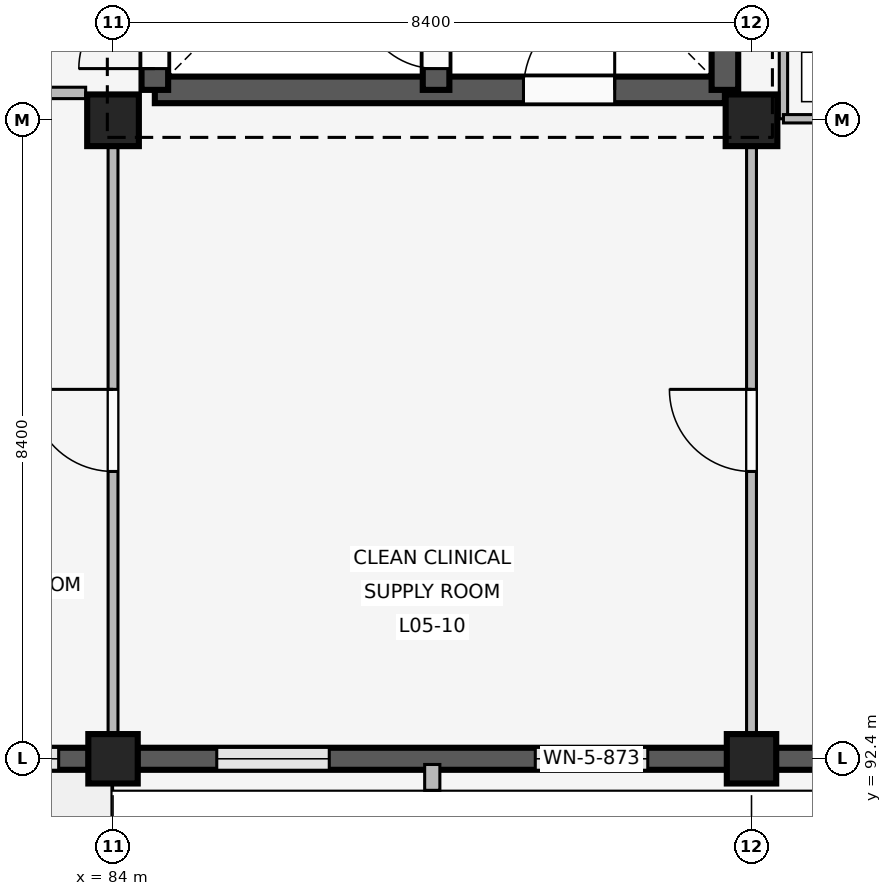
"""IFC4 building model, lengths in metres.
Left out: names, types, materials, properties, quantities, classifications, styles, units other than length and angle.
Written with IfcOpenShell. Run it as: python <this file> out.ifc"""

import sys

from ifc_helpers import new_model, si_unit, direction, frame, frame_2d, origin, origin_2d, place, context, subcontext, project, spatial, rectangle, extrude, element, fill, save


model = new_model("IFC4")
c1 = context("Model", 3, precision=1e-05, world=origin(), true_north=direction((0.0, 1.0)))
c2 = subcontext(c1, "Body", "Model", "MODEL_VIEW")
j1 = project(units=[si_unit("LENGTHUNIT", "METRE"), si_unit("PLANEANGLEUNIT", "RADIAN")], contexts=[c1])
p1 = place(None, origin())
s1 = spatial("IfcSite", under=j1, at=p1, CompositionType="ELEMENT")
p2 = place(p1, origin())
s2 = spatial("IfcBuilding", under=s1, at=p2, CompositionType="ELEMENT")
p3 = place(p2, frame((0.0, 0.0, 20.4)))
s3 = spatial("IfcBuildingStorey", under=s2, at=p3, CompositionType="ELEMENT", Elevation=20.4)
p4 = place(p3, frame((84.0, 92.4, 0.0), z_axis=(0.0, 0.0, 1.0), x_axis=(1.0, 0.0, 0.0)))
e1 = element("IfcColumn", 1, at=p4, inside=s3, PredefinedType="COLUMN", context=c2, shape_type="SweptSolid", body=[
    extrude(rectangle(XDim=0.65, YDim=0.65, at=origin_2d()), origin(), (0.0, 0.0, 1.0), 4.2),
])
p5 = place(p3, frame((84.0, 100.8, 0.0), z_axis=(0.0, 0.0, 1.0), x_axis=(1.0, 0.0, 0.0)))
e2 = element("IfcColumn", 2, at=p5, inside=s3, PredefinedType="COLUMN", context=c2, shape_type="SweptSolid", body=[
    extrude(rectangle(XDim=0.68, YDim=0.68, at=origin_2d()), origin(), (0.0, 0.0, 1.0), 4.2),
])
p6 = place(p3, frame((92.4, 92.4, 0.0), z_axis=(0.0, 0.0, 1.0), x_axis=(1.0, 0.0, 0.0)))
e3 = element("IfcColumn", 3, at=p6, inside=s3, PredefinedType="COLUMN", context=c2, shape_type="SweptSolid", body=[
    extrude(rectangle(XDim=0.65, YDim=0.65, at=origin_2d()), origin(), (0.0, 0.0, 1.0), 4.2),
])
p7 = place(p3, frame((92.4, 100.8, 0.0), z_axis=(0.0, 0.0, 1.0), x_axis=(1.0, 0.0, 0.0)))
e4 = element("IfcColumn", 4, at=p7, inside=s3, PredefinedType="COLUMN", context=c2, shape_type="SweptSolid", body=[
    extrude(rectangle(XDim=0.68, YDim=0.68, at=origin_2d()), origin(), (0.0, 0.0, 1.0), 4.2),
])
p8 = place(p3, frame((83.68, 92.4, 0.0), z_axis=(0.0, 0.0, 1.0), x_axis=(-1.0, 0.0, 0.0)))
e5 = element("IfcWall", 5, at=p8, inside=s3, PredefinedType="SOLIDWALL", context=c2, shape_type="SweptSolid", body=[
    extrude(rectangle(XDim=7.76, YDim=0.29, at=frame_2d((3.88, 0.0))), origin(), (0.0, 0.0, 1.0), 3.34),
])
p9 = place(p8, frame((0.395, 0.0, 0.85)))
e6 = element("IfcOpeningElement", 6, at=p9, cuts=e5, PredefinedType="OPENING", context=c2, shape_type="SweptSolid", body=[
    extrude(rectangle(XDim=1.58, YDim=1.7, at=frame_2d((0.79, 0.85))), frame((0.0, 0.155, 0.0), z_axis=(0.0, -1.0, 0.0), x_axis=(1.0, 0.0, 0.0)), (0.0, 0.0, 1.0), 0.31),
])
p10 = place(p8, frame((5.185, 0.0, 0.85)))
e7 = element("IfcOpeningElement", 7, at=p10, cuts=e5, PredefinedType="OPENING", context=c2, shape_type="SweptSolid", body=[
    extrude(rectangle(XDim=1.58, YDim=1.7, at=frame_2d((0.79, 0.85))), frame((0.0, 0.155, 0.0), z_axis=(0.0, -1.0, 0.0), x_axis=(1.0, 0.0, 0.0)), (0.0, 0.0, 1.0), 0.31),
])
p11 = place(p3, frame((92.08, 92.4, 0.0), z_axis=(0.0, 0.0, 1.0), x_axis=(-1.0, 0.0, 0.0)))
e8 = element("IfcWall", 8, at=p11, inside=s3, PredefinedType="SOLIDWALL", context=c2, shape_type="SweptSolid", body=[
    extrude(rectangle(XDim=7.76, YDim=0.29, at=frame_2d((3.88, 0.0))), origin(), (0.0, 0.0, 1.0), 3.34),
])
p12 = place(p11, frame((1.045, 0.0, 0.85)))
e9 = element("IfcOpeningElement", 9, at=p12, cuts=e8, PredefinedType="OPENING", context=c2, shape_type="SweptSolid", body=[
    extrude(rectangle(XDim=1.48, YDim=1.6, at=frame_2d((0.74, 0.8))), frame((0.0, 0.155, 0.0), z_axis=(0.0, -1.0, 0.0), x_axis=(1.0, 0.0, 0.0)), (0.0, 0.0, 1.0), 0.31),
])
p13 = place(p11, frame((5.235, 0.0, 0.85)))
e10 = element("IfcOpeningElement", 10, at=p13, cuts=e8, PredefinedType="OPENING", context=c2, shape_type="SweptSolid", body=[
    extrude(rectangle(XDim=1.48, YDim=1.6, at=frame_2d((0.74, 0.8))), frame((0.0, 0.155, 0.0), z_axis=(0.0, -1.0, 0.0), x_axis=(1.0, 0.0, 0.0)), (0.0, 0.0, 1.0), 0.31),
])
p14 = place(p3, frame((88.2, 92.325, 0.0), z_axis=(0.0, 0.0, 1.0), x_axis=(0.0, -1.0, 0.0)))
e11 = element("IfcWall", 11, at=p14, inside=s3, PredefinedType="ELEMENTEDWALL", context=c2, shape_type="SweptSolid", body=[
    extrude(rectangle(XDim=0.34, YDim=0.2, at=frame_2d((0.17, 0.0))), origin(), (0.0, 0.0, 1.0), 3.32),
])
p15 = place(p3, frame((100.48, 92.4, 0.0), z_axis=(0.0, 0.0, 1.0), x_axis=(-1.0, 0.0, 0.0)))
e12 = element("IfcWall", 12, at=p15, inside=s3, PredefinedType="SOLIDWALL", context=c2, shape_type="SweptSolid", body=[
    extrude(rectangle(XDim=7.76, YDim=0.29, at=frame_2d((3.88, 0.0))), origin(), (0.0, 0.0, 1.0), 3.34),
])
p16 = place(p15, frame((1.075, 0.0, 0.85)))
e13 = element("IfcOpeningElement", 13, at=p16, cuts=e12, PredefinedType="OPENING", context=c2, shape_type="SweptSolid", body=[
    extrude(rectangle(XDim=1.42, YDim=1.45, at=frame_2d((0.71, 0.725))), frame((0.0, 0.155, 0.0), z_axis=(0.0, -1.0, 0.0), x_axis=(1.0, 0.0, 0.0)), (0.0, 0.0, 1.0), 0.31),
])
p17 = place(p15, frame((5.265, 0.0, 0.85)))
e14 = element("IfcOpeningElement", 14, at=p17, cuts=e12, PredefinedType="OPENING", context=c2, shape_type="SweptSolid", body=[
    extrude(rectangle(XDim=1.42, YDim=1.45, at=frame_2d((0.71, 0.725))), frame((0.0, 0.155, 0.0), z_axis=(0.0, -1.0, 0.0), x_axis=(1.0, 0.0, 0.0)), (0.0, 0.0, 1.0), 0.31),
])
p18 = place(p3, frame((84.55, 101.2, 0.0), z_axis=(0.0, 0.0, 1.0), x_axis=(1.0, 0.0, 0.0)))
e15 = element("IfcWall", 15, at=p18, inside=s3, PredefinedType="SHEAR", context=c2, shape_type="SweptSolid", body=[
    extrude(rectangle(XDim=7.5, YDim=0.35, at=frame_2d((3.75, 0.0))), origin(), (0.0, 0.0, 1.0), 3.92),
])
p19 = place(p18, frame((4.85, 0.0, 0.0)))
e16 = element("IfcOpeningElement", 16, at=p19, cuts=e15, PredefinedType="OPENING", context=c2, shape_type="SweptSolid", body=[
    extrude(rectangle(XDim=1.2, YDim=2.2, at=frame_2d((0.6, 1.1))), frame((0.0, 0.185, 0.0), z_axis=(0.0, -1.0, 0.0), x_axis=(1.0, 0.0, 0.0)), (0.0, 0.0, 1.0), 0.37),
])
p20 = place(p3, frame((84.55, 101.2, 0.0), z_axis=(0.0, 0.0, 1.0), x_axis=(0.0, 1.0, 0.0)))
e17 = element("IfcWall", 17, at=p20, inside=s3, PredefinedType="SHEAR", context=c2, shape_type="SweptSolid", body=[
    extrude(rectangle(XDim=7.55, YDim=0.35, at=frame_2d((3.775, 0.0))), origin(), (0.0, 0.0, 1.0), 3.92),
])
p21 = place(p20, frame((0.28, 0.0, 0.0)))
e18 = element("IfcOpeningElement", 18, at=p21, cuts=e17, PredefinedType="OPENING", context=c2, shape_type="SweptSolid", body=[
    extrude(rectangle(XDim=1.0, YDim=2.15, at=frame_2d((0.5, 1.075))), frame((0.0, 0.185, 0.0), z_axis=(0.0, -1.0, 0.0), x_axis=(1.0, 0.0, 0.0)), (0.0, 0.0, 1.0), 0.37),
])
p22 = place(p3, frame((92.05, 101.2, 0.0), z_axis=(0.0, 0.0, 1.0), x_axis=(0.0, 1.0, 0.0)))
e19 = element("IfcWall", 19, at=p22, inside=s3, PredefinedType="SHEAR", context=c2, shape_type="SweptSolid", body=[
    extrude(rectangle(XDim=7.55, YDim=0.35, at=frame_2d((3.775, 0.0))), origin(), (0.0, 0.0, 1.0), 3.92),
])
p23 = place(p22, frame((2.4, 0.0, 0.0)))
e20 = element("IfcOpeningElement", 20, at=p23, cuts=e19, PredefinedType="OPENING", context=c2, shape_type="SweptSolid", body=[
    extrude(rectangle(XDim=1.2, YDim=2.2, at=frame_2d((0.6, 1.1))), frame((0.0, 0.185, 0.0), z_axis=(0.0, -1.0, 0.0), x_axis=(1.0, 0.0, 0.0)), (0.0, 0.0, 1.0), 0.37),
])
p24 = place(p3, frame((88.25, 101.2, 0.0), z_axis=(0.0, 0.0, 1.0), x_axis=(0.0, 1.0, 0.0)))
e21 = element("IfcWall", 21, at=p24, inside=s3, PredefinedType="SHEAR", context=c2, shape_type="SweptSolid", body=[
    extrude(rectangle(XDim=7.55, YDim=0.35, at=frame_2d((3.775, 0.0))), origin(), (0.0, 0.0, 1.0), 3.92),
])
p25 = place(p24, frame((0.28, 0.0, 0.0)))
e22 = element("IfcOpeningElement", 22, at=p25, cuts=e21, PredefinedType="OPENING", context=c2, shape_type="SweptSolid", body=[
    extrude(rectangle(XDim=1.0, YDim=2.15, at=frame_2d((0.5, 1.075))), frame((0.0, 0.185, 0.0), z_axis=(0.0, -1.0, 0.0), x_axis=(1.0, 0.0, 0.0)), (0.0, 0.0, 1.0), 0.37),
])
p26 = place(p3, frame((81.46, 101.16, 0.0), z_axis=(0.0, 0.0, 1.0), x_axis=(1.0, 0.0, 0.0)))
e23 = element("IfcWall", 23, at=p26, inside=s3, PredefinedType="PARTITIONING", context=c2, shape_type="SweptSolid", body=[
    extrude(rectangle(XDim=2.18, YDim=0.15, at=frame_2d((1.09, 0.0))), origin(), (0.0, 0.0, 1.0), 3.32),
])
p27 = place(p26, frame((0.5, 0.0, 0.0)))
e24 = element("IfcOpeningElement", 24, at=p27, cuts=e23, PredefinedType="OPENING", context=c2, shape_type="SweptSolid", body=[
    extrude(rectangle(XDim=1.08, YDim=2.15, at=frame_2d((0.54, 1.075))), frame((0.0, 0.085, 0.0), z_axis=(0.0, -1.0, 0.0), x_axis=(1.0, 0.0, 0.0)), (0.0, 0.0, 1.0), 0.17),
])
p28 = place(p3, frame((84.0, 92.54, 0.0), z_axis=(0.0, 0.0, 1.0), x_axis=(0.0, 1.0, 0.0)))
e25 = element("IfcWall", 25, at=p28, inside=s3, PredefinedType="PARTITIONING", context=c2, shape_type="SweptSolid", body=[
    extrude(rectangle(XDim=8.21, YDim=0.13, at=frame_2d((4.105, 0.0))), origin(), (0.0, 0.0, 1.0), 3.32),
])
p29 = place(p28, frame((3.64, 0.0, 0.0)))
e26 = element("IfcOpeningElement", 26, at=p29, cuts=e25, PredefinedType="OPENING", context=c2, shape_type="SweptSolid", body=[
    extrude(rectangle(XDim=1.08, YDim=2.15, at=frame_2d((0.54, 1.075))), frame((0.0, 0.075, 0.0), z_axis=(0.0, -1.0, 0.0), x_axis=(1.0, 0.0, 0.0)), (0.0, 0.0, 1.0), 0.15),
])
p30 = place(p3, frame((92.4, 92.54, 0.0), z_axis=(0.0, 0.0, 1.0), x_axis=(0.0, 1.0, 0.0)))
e27 = element("IfcWall", 27, at=p30, inside=s3, PredefinedType="PARTITIONING", context=c2, shape_type="SweptSolid", body=[
    extrude(rectangle(XDim=8.21, YDim=0.13, at=frame_2d((4.105, 0.0))), origin(), (0.0, 0.0, 1.0), 3.32),
])
p31 = place(p30, frame((3.64, 0.0, 0.0)))
e28 = element("IfcOpeningElement", 28, at=p31, cuts=e27, PredefinedType="OPENING", context=c2, shape_type="SweptSolid", body=[
    extrude(rectangle(XDim=1.08, YDim=2.15, at=frame_2d((0.54, 1.075))), frame((0.0, 0.075, 0.0), z_axis=(0.0, -1.0, 0.0), x_axis=(1.0, 0.0, 0.0)), (0.0, 0.0, 1.0), 0.15),
])
p32 = place(p3, frame((92.82, 100.82, 0.0), z_axis=(0.0, 0.0, 1.0), x_axis=(0.0, 1.0, 0.0)))
e29 = element("IfcWall", 29, at=p32, inside=s3, PredefinedType="PARTITIONING", context=c2, shape_type="SweptSolid", body=[
    extrude(rectangle(XDim=2.61, YDim=0.11, at=frame_2d((1.305, 0.0))), origin(), (0.0, 0.0, 1.0), 3.32),
])
p33 = place(p3, frame((92.82, 100.82, 0.0), z_axis=(0.0, 0.0, 1.0), x_axis=(1.0, 0.0, 0.0)))
e30 = element("IfcWall", 30, at=p33, inside=s3, PredefinedType="PARTITIONING", context=c2, shape_type="SweptSolid", body=[
    extrude(rectangle(XDim=1.98, YDim=0.11, at=frame_2d((0.99, 0.0))), origin(), (0.0, 0.0, 1.0), 3.32),
])
p34 = place(p33, frame((0.54, 0.0, 0.0)))
e31 = element("IfcOpeningElement", 31, at=p34, cuts=e30, PredefinedType="OPENING", context=c2, shape_type="SweptSolid", body=[
    extrude(rectangle(XDim=0.9, YDim=2.1, at=frame_2d((0.45, 1.05))), frame((0.0, 0.065, 0.0), z_axis=(0.0, -1.0, 0.0), x_axis=(1.0, 0.0, 0.0)), (0.0, 0.0, 1.0), 0.13),
])
p35 = place(p9, origin())
e32 = element("IfcWindow", 32, at=p35, inside=s3, PartitioningType="SINGLE_PANEL", PredefinedType="WINDOW", context=c2, shape_type="SweptSolid", body=[
    extrude(rectangle(XDim=1.58, YDim=1.7, at=frame_2d((0.79, 0.85))), frame((0.0, 0.03, 0.0), z_axis=(0.0, -1.0, 0.0), x_axis=(1.0, 0.0, 0.0)), (0.0, 0.0, 1.0), 0.06),
])
fill(e6, e32)
p36 = place(p12, origin())
e33 = element("IfcWindow", 33, at=p36, inside=s3, PartitioningType="SINGLE_PANEL", PredefinedType="WINDOW", context=c2, shape_type="SweptSolid", body=[
    extrude(rectangle(XDim=1.48, YDim=1.6, at=frame_2d((0.74, 0.8))), frame((0.0, 0.03, 0.0), z_axis=(0.0, -1.0, 0.0), x_axis=(1.0, 0.0, 0.0)), (0.0, 0.0, 1.0), 0.06),
])
fill(e9, e33)
p37 = place(p13, origin())
e34 = element("IfcWindow", 34, at=p37, inside=s3, PartitioningType="SINGLE_PANEL", PredefinedType="WINDOW", context=c2, shape_type="SweptSolid", body=[
    extrude(rectangle(XDim=1.48, YDim=1.6, at=frame_2d((0.74, 0.8))), frame((0.0, 0.03, 0.0), z_axis=(0.0, -1.0, 0.0), x_axis=(1.0, 0.0, 0.0)), (0.0, 0.0, 1.0), 0.06),
])
fill(e10, e34)
p38 = place(p19, origin())
e35 = element("IfcDoor", 35, at=p38, inside=s3, OperationType="SINGLE_SWING_RIGHT", PredefinedType="DOOR", context=c2, shape_type="SweptSolid", body=[
    extrude(rectangle(XDim=1.2, YDim=2.2, at=frame_2d((0.6, 1.1))), frame((0.0, 0.025, 0.0), z_axis=(0.0, -1.0, 0.0), x_axis=(1.0, 0.0, 0.0)), (0.0, 0.0, 1.0), 0.05),
])
fill(e16, e35)
p39 = place(p21, origin())
e36 = element("IfcDoor", 36, at=p39, inside=s3, OperationType="SINGLE_SWING_LEFT", PredefinedType="DOOR", context=c2, shape_type="SweptSolid", body=[
    extrude(rectangle(XDim=1.0, YDim=2.15, at=frame_2d((0.5, 1.075))), frame((0.0, 0.025, 0.0), z_axis=(0.0, -1.0, 0.0), x_axis=(1.0, 0.0, 0.0)), (0.0, 0.0, 1.0), 0.05),
])
fill(e18, e36)
p40 = place(p25, origin())
e37 = element("IfcDoor", 37, at=p40, inside=s3, OperationType="SINGLE_SWING_RIGHT", PredefinedType="DOOR", context=c2, shape_type="SweptSolid", body=[
    extrude(rectangle(XDim=1.0, YDim=2.15, at=frame_2d((0.5, 1.075))), frame((0.0, 0.025, 0.0), z_axis=(0.0, -1.0, 0.0), x_axis=(1.0, 0.0, 0.0)), (0.0, 0.0, 1.0), 0.05),
])
fill(e22, e37)
p41 = place(p29, origin())
e38 = element("IfcDoor", 38, at=p41, inside=s3, OperationType="SINGLE_SWING_RIGHT", PredefinedType="DOOR", context=c2, shape_type="SweptSolid", body=[
    extrude(rectangle(XDim=1.08, YDim=2.15, at=frame_2d((0.54, 1.075))), frame((0.0, 0.025, 0.0), z_axis=(0.0, -1.0, 0.0), x_axis=(1.0, 0.0, 0.0)), (0.0, 0.0, 1.0), 0.05),
])
fill(e26, e38)
p42 = place(p31, origin())
e39 = element("IfcDoor", 39, at=p42, inside=s3, OperationType="SINGLE_SWING_RIGHT", PredefinedType="DOOR", context=c2, shape_type="SweptSolid", body=[
    extrude(rectangle(XDim=1.08, YDim=2.15, at=frame_2d((0.54, 1.075))), frame((0.0, 0.025, 0.0), z_axis=(0.0, -1.0, 0.0), x_axis=(1.0, 0.0, 0.0)), (0.0, 0.0, 1.0), 0.05),
])
fill(e28, e39)
save(model, sys.argv[1])
